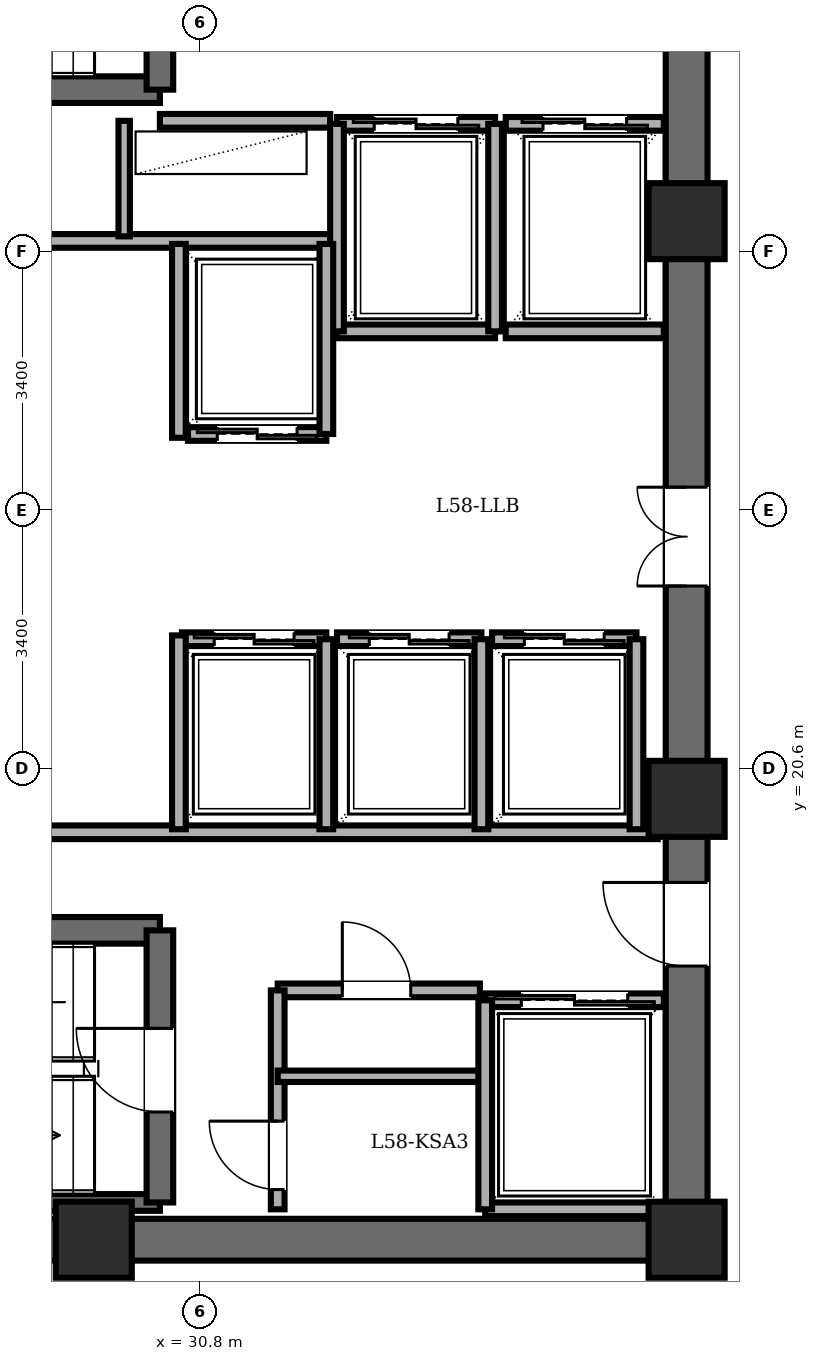
"""IFC4 building model, lengths in metres.
Left out: names, types, materials, properties, quantities, classifications, styles, units other than length and angle.
Written with IfcOpenShell. Run it as: python <this file> out.ifc"""

import sys

from ifc_helpers import new_model, si_unit, direction, frame, frame_2d, origin, origin_2d, place, context, subcontext, project, spatial, rectangle, extrude, element, fill, save


model = new_model("IFC4")
c1 = context("Model", 3, precision=1e-05, world=origin(), true_north=direction((0.0, 1.0)))
c2 = subcontext(c1, "Body", "Model", "MODEL_VIEW")
j1 = project(units=[si_unit("LENGTHUNIT", "METRE"), si_unit("PLANEANGLEUNIT", "RADIAN")], contexts=[c1])
p1 = place(None, origin())
s1 = spatial("IfcSite", under=j1, at=p1, CompositionType="ELEMENT")
p2 = place(p1, origin())
s2 = spatial("IfcBuilding", under=s1, at=p2, CompositionType="ELEMENT")
p3 = place(p2, frame((0.0, 0.0, 222.9)))
s3 = spatial("IfcBuildingStorey", under=s2, at=p3, CompositionType="ELEMENT", Elevation=222.9)
for number, where, z_axis, x_axis in (
    (1, (29.4, 14.4, 0.0), (0.0, 0.0, 1.0), (1.0, 0.0, 0.0)),
    (2, (37.2, 14.4, 0.0), (0.0, 0.0, 1.0), (1.0, 0.0, 0.0)),
    (3, (37.2, 20.2, 0.0), (0.0, 0.0, 1.0), (1.0, 0.0, 0.0)),
    (4, (37.2, 27.8, 0.0), (0.0, 0.0, 1.0), (1.0, 0.0, 0.0)),
):
    element("IfcColumn", number, at=place(p3, frame(where, z_axis=z_axis, x_axis=x_axis)), inside=s3, PredefinedType="COLUMN", context=c2, shape_type="SweptSolid", body=[
        extrude(rectangle(XDim=1.0, YDim=1.0, at=origin_2d()), origin(), (0.0, 0.0, 1.0), 3.6),
    ])
p4 = place(p3, frame((37.2, 14.4, 0.0), z_axis=(0.0, 0.0, 1.0), x_axis=(-1.0, 0.0, 0.0)))
e5 = element("IfcWall", 5, at=p4, inside=s3, PredefinedType="SHEAR", context=c2, shape_type="SweptSolid", body=[
    extrude(rectangle(XDim=15.6, YDim=0.55, at=frame_2d((7.8, 0.0))), origin(), (0.0, 0.0, 1.0), 3.4),
])
p5 = place(p3, frame((37.2, 14.4, 0.0), z_axis=(0.0, 0.0, 1.0), x_axis=(0.0, 1.0, 0.0)))
e6 = element("IfcWall", 6, at=p5, inside=s3, PredefinedType="SHEAR", context=c2, shape_type="SweptSolid", body=[
    extrude(rectangle(XDim=19.2, YDim=0.55, at=frame_2d((9.6, 0.0))), origin(), (0.0, 0.0, 1.0), 3.4),
])
p6 = place(p5, frame((15.8, 0.0, 0.0)))
e7 = element("IfcOpeningElement", 7, at=p6, cuts=e6, PredefinedType="OPENING", context=c2, shape_type="SweptSolid", body=[
    extrude(rectangle(XDim=1.15, YDim=2.15, at=frame_2d((0.575, 1.075))), frame((0.0, 0.285, 0.0), z_axis=(0.0, -1.0, 0.0), x_axis=(1.0, 0.0, 0.0)), (0.0, 0.0, 1.0), 0.57),
])
p7 = place(p5, frame((3.6, 0.0, 0.0)))
e8 = element("IfcOpeningElement", 8, at=p7, cuts=e6, PredefinedType="OPENING", context=c2, shape_type="SweptSolid", body=[
    extrude(rectangle(XDim=1.1, YDim=2.15, at=frame_2d((0.55, 1.075))), frame((0.0, 0.285, 0.0), z_axis=(0.0, -1.0, 0.0), x_axis=(1.0, 0.0, 0.0)), (0.0, 0.0, 1.0), 0.57),
])
p8 = place(p5, frame((8.6, 0.0, 0.0)))
e9 = element("IfcOpeningElement", 9, at=p8, cuts=e6, PredefinedType="OPENING", context=c2, shape_type="SweptSolid", body=[
    extrude(rectangle(XDim=1.3, YDim=2.2, at=frame_2d((0.65, 1.1))), frame((0.0, 0.285, 0.0), z_axis=(0.0, -1.0, 0.0), x_axis=(1.0, 0.0, 0.0)), (0.0, 0.0, 1.0), 0.57),
])
p9 = place(p3, frame((22.48, 29.53, 0.0), z_axis=(0.0, 0.0, 1.0), x_axis=(1.0, 0.0, 0.0)))
e10 = element("IfcWall", 10, at=p9, inside=s3, PredefinedType="SOLIDWALL", context=c2, shape_type="SweptSolid", body=[
    extrude(rectangle(XDim=7.79, YDim=0.35, at=frame_2d((3.895, 0.0))), origin(), (0.0, 0.0, 1.0), 3.4),
])
p10 = place(p3, frame((30.27, 29.53, 0.0), z_axis=(0.0, 0.0, 1.0), x_axis=(0.0, 1.0, 0.0)))
e11 = element("IfcWall", 11, at=p10, inside=s3, PredefinedType="SOLIDWALL", context=c2, shape_type="SweptSolid", body=[
    extrude(rectangle(XDim=3.58, YDim=0.35, at=frame_2d((1.79, 0.0))), origin(), (0.0, 0.0, 1.0), 3.4),
])
p11 = place(p10, frame((1.25, 0.0, 0.0)))
e12 = element("IfcOpeningElement", 12, at=p11, cuts=e11, PredefinedType="OPENING", context=c2, shape_type="SweptSolid", body=[
    extrude(rectangle(XDim=1.1, YDim=2.15, at=frame_2d((0.55, 1.075))), frame((0.0, 0.185, 0.0), z_axis=(0.0, -1.0, 0.0), x_axis=(1.0, 0.0, 0.0)), (0.0, 0.0, 1.0), 0.37),
])
p12 = place(p3, frame((22.48, 18.47, 0.0), z_axis=(0.0, 0.0, 1.0), x_axis=(1.0, 0.0, 0.0)))
e13 = element("IfcWall", 13, at=p12, inside=s3, PredefinedType="SOLIDWALL", context=c2, shape_type="SweptSolid", body=[
    extrude(rectangle(XDim=7.79, YDim=0.35, at=frame_2d((3.895, 0.0))), origin(), (0.0, 0.0, 1.0), 3.4),
])
p13 = place(p3, frame((22.48, 14.89, 0.0), z_axis=(0.0, 0.0, 1.0), x_axis=(1.0, 0.0, 0.0)))
e14 = element("IfcWall", 14, at=p13, inside=s3, PredefinedType="PARTITIONING", context=c2, shape_type="SweptSolid", body=[
    extrude(rectangle(XDim=7.79, YDim=0.22, at=frame_2d((3.895, 0.0))), origin(), (0.0, 0.0, 1.0), 3.4),
])
p14 = place(p3, frame((30.27, 14.89, 0.0), z_axis=(0.0, 0.0, 1.0), x_axis=(0.0, 1.0, 0.0)))
e15 = element("IfcWall", 15, at=p14, inside=s3, PredefinedType="SOLIDWALL", context=c2, shape_type="SweptSolid", body=[
    extrude(rectangle(XDim=3.58, YDim=0.35, at=frame_2d((1.79, 0.0))), origin(), (0.0, 0.0, 1.0), 3.4),
])
p15 = place(p14, frame((1.19, 0.0, 0.0)))
e16 = element("IfcOpeningElement", 16, at=p15, cuts=e15, PredefinedType="OPENING", context=c2, shape_type="SweptSolid", body=[
    extrude(rectangle(XDim=1.1, YDim=2.15, at=frame_2d((0.55, 1.075))), frame((0.0, 0.185, 0.0), z_axis=(0.0, -1.0, 0.0), x_axis=(1.0, 0.0, 0.0)), (0.0, 0.0, 1.0), 0.37),
])
p16 = place(p3, frame((30.27, 29.12, 0.0), z_axis=(0.0, 0.0, 1.0), x_axis=(1.0, 0.0, 0.0)))
e17 = element("IfcWall", 17, at=p16, inside=s3, PredefinedType="PARTITIONING", context=c2, shape_type="SweptSolid", body=[
    extrude(rectangle(XDim=2.24, YDim=0.18, at=frame_2d((1.12, 0.0))), origin(), (0.0, 0.0, 1.0), 3.4),
])
p17 = place(p3, frame((21.95, 27.54, 0.0), z_axis=(0.0, 0.0, 1.0), x_axis=(1.0, 0.0, 0.0)))
e18 = element("IfcWall", 18, at=p17, inside=s3, PredefinedType="PARTITIONING", context=c2, shape_type="SweptSolid", body=[
    extrude(rectangle(XDim=10.56, YDim=0.18, at=frame_2d((5.28, 0.0))), origin(), (0.0, 0.0, 1.0), 3.4),
])
p18 = place(p3, frame((29.8, 27.6, 0.0), z_axis=(0.0, 0.0, 1.0), x_axis=(0.0, 1.0, 0.0)))
e19 = element("IfcWall", 19, at=p18, inside=s3, PredefinedType="PARTITIONING", context=c2, shape_type="SweptSolid", body=[
    extrude(rectangle(XDim=1.52, YDim=0.15, at=frame_2d((0.76, 0.0))), origin(), (0.0, 0.0, 1.0), 3.4),
])
p19 = place(p3, frame((21.95, 19.76, 0.0), z_axis=(0.0, 0.0, 1.0), x_axis=(1.0, 0.0, 0.0)))
e20 = element("IfcWall", 20, at=p19, inside=s3, PredefinedType="PARTITIONING", context=c2, shape_type="SweptSolid", body=[
    extrude(rectangle(XDim=14.87, YDim=0.18, at=frame_2d((7.435, 0.0))), origin(), (0.0, 0.0, 1.0), 3.4),
])
p20 = place(p3, frame((31.82, 17.68, 0.0), z_axis=(0.0, 0.0, 1.0), x_axis=(1.0, 0.0, 0.0)))
e21 = element("IfcWall", 21, at=p20, inside=s3, PredefinedType="PARTITIONING", context=c2, shape_type="SweptSolid", body=[
    extrude(rectangle(XDim=2.66, YDim=0.18, at=frame_2d((1.33, 0.0))), origin(), (0.0, 0.0, 1.0), 3.4),
])
p21 = place(p20, frame((0.85, 0.0, 0.0)))
e22 = element("IfcOpeningElement", 22, at=p21, cuts=e21, PredefinedType="OPENING", context=c2, shape_type="SweptSolid", body=[
    extrude(rectangle(XDim=0.9, YDim=2.05, at=frame_2d((0.45, 1.025))), frame((0.0, 0.1, 0.0), z_axis=(0.0, -1.0, 0.0), x_axis=(1.0, 0.0, 0.0)), (0.0, 0.0, 1.0), 0.2),
])
p22 = place(p3, frame((31.82, 14.8, 0.0), z_axis=(0.0, 0.0, 1.0), x_axis=(0.0, 1.0, 0.0)))
e23 = element("IfcWall", 23, at=p22, inside=s3, PredefinedType="PARTITIONING", context=c2, shape_type="SweptSolid", body=[
    extrude(rectangle(XDim=2.88, YDim=0.18, at=frame_2d((1.44, 0.0))), origin(), (0.0, 0.0, 1.0), 3.4),
])
p23 = place(p22, frame((0.26, 0.0, 0.0)))
e24 = element("IfcOpeningElement", 24, at=p23, cuts=e23, PredefinedType="OPENING", context=c2, shape_type="SweptSolid", body=[
    extrude(rectangle(XDim=0.9, YDim=2.05, at=frame_2d((0.45, 1.025))), frame((0.0, 0.1, 0.0), z_axis=(0.0, -1.0, 0.0), x_axis=(1.0, 0.0, 0.0)), (0.0, 0.0, 1.0), 0.2),
])
p24 = place(p3, frame((31.82, 16.55, 0.0), z_axis=(0.0, 0.0, 1.0), x_axis=(1.0, 0.0, 0.0)))
e25 = element("IfcWall", 25, at=p24, inside=s3, PredefinedType="PARTITIONING", context=c2, shape_type="SweptSolid", body=[
    extrude(rectangle(XDim=2.66, YDim=0.15, at=frame_2d((1.33, 0.0))), origin(), (0.0, 0.0, 1.0), 3.4),
])
p25 = place(p3, frame((32.6, 29.08, 0.0), z_axis=(0.0, 0.0, 1.0), x_axis=(1.0, 0.0, 0.0)))
e26 = element("IfcWall", 26, at=p25, inside=s3, PredefinedType="PARTITIONING", context=c2, shape_type="SweptSolid", body=[
    extrude(rectangle(XDim=2.08, YDim=0.18, at=frame_2d((1.04, 0.0))), origin(), (0.0, 0.0, 1.0), 3.4),
])
p26 = place(p25, frame((0.49, 0.0, 0.0)))
e27 = element("IfcOpeningElement", 27, at=p26, cuts=e26, PredefinedType="OPENING", context=c2, shape_type="SweptSolid", body=[
    extrude(rectangle(XDim=1.1, YDim=2.2, at=frame_2d((0.55, 1.1))), frame((0.0, 0.1, 0.0), z_axis=(0.0, -1.0, 0.0), x_axis=(1.0, 0.0, 0.0)), (0.0, 0.0, 1.0), 0.2),
])
p27 = place(p3, frame((34.68, 26.35, 0.0), z_axis=(0.0, 0.0, 1.0), x_axis=(-1.0, 0.0, 0.0)))
e28 = element("IfcWall", 28, at=p27, inside=s3, PredefinedType="PARTITIONING", context=c2, shape_type="SweptSolid", body=[
    extrude(rectangle(XDim=2.08, YDim=0.18, at=frame_2d((1.04, 0.0))), origin(), (0.0, 0.0, 1.0), 3.4),
])
for number, where, z_axis, x_axis in (
    (29, (34.68, 26.35, 0.0), (0.0, 0.0, 1.0), (0.0, 1.0, 0.0)),
    (30, (32.6, 29.08, 0.0), (0.0, 0.0, 1.0), (0.0, -1.0, 0.0)),
):
    element("IfcWall", number, at=place(p3, frame(where, z_axis=z_axis, x_axis=x_axis)), inside=s3, PredefinedType="PARTITIONING", context=c2, shape_type="SweptSolid", body=[
        extrude(rectangle(XDim=2.73, YDim=0.18, at=frame_2d((1.365, 0.0))), origin(), (0.0, 0.0, 1.0), 3.4),
    ])
p28 = place(p3, frame((34.82, 29.08, 0.0), z_axis=(0.0, 0.0, 1.0), x_axis=(1.0, 0.0, 0.0)))
e31 = element("IfcWall", 31, at=p28, inside=s3, PredefinedType="PARTITIONING", context=c2, shape_type="SweptSolid", body=[
    extrude(rectangle(XDim=2.08, YDim=0.18, at=frame_2d((1.04, 0.0))), origin(), (0.0, 0.0, 1.0), 3.4),
])
p29 = place(p28, frame((0.49, 0.0, 0.0)))
e32 = element("IfcOpeningElement", 32, at=p29, cuts=e31, PredefinedType="OPENING", context=c2, shape_type="SweptSolid", body=[
    extrude(rectangle(XDim=1.1, YDim=2.2, at=frame_2d((0.55, 1.1))), frame((0.0, 0.1, 0.0), z_axis=(0.0, -1.0, 0.0), x_axis=(1.0, 0.0, 0.0)), (0.0, 0.0, 1.0), 0.2),
])
p30 = place(p3, frame((36.9, 26.35, 0.0), z_axis=(0.0, 0.0, 1.0), x_axis=(-1.0, 0.0, 0.0)))
e33 = element("IfcWall", 33, at=p30, inside=s3, PredefinedType="PARTITIONING", context=c2, shape_type="SweptSolid", body=[
    extrude(rectangle(XDim=2.08, YDim=0.18, at=frame_2d((1.04, 0.0))), origin(), (0.0, 0.0, 1.0), 3.4),
])
p31 = place(p3, frame((34.55, 17.55, 0.0), z_axis=(0.0, 0.0, 1.0), x_axis=(1.0, 0.0, 0.0)))
e34 = element("IfcWall", 34, at=p31, inside=s3, PredefinedType="PARTITIONING", context=c2, shape_type="SweptSolid", body=[
    extrude(rectangle(XDim=2.35, YDim=0.18, at=frame_2d((1.175, 0.0))), origin(), (0.0, 0.0, 1.0), 3.4),
])
p32 = place(p31, frame((0.475, 0.0, 0.0)))
e35 = element("IfcOpeningElement", 35, at=p32, cuts=e34, PredefinedType="OPENING", context=c2, shape_type="SweptSolid", body=[
    extrude(rectangle(XDim=1.4, YDim=2.3, at=frame_2d((0.7, 1.15))), frame((0.0, 0.1, 0.0), z_axis=(0.0, -1.0, 0.0), x_axis=(1.0, 0.0, 0.0)), (0.0, 0.0, 1.0), 0.2),
])
p33 = place(p3, frame((36.9, 14.8, 0.0), z_axis=(0.0, 0.0, 1.0), x_axis=(-1.0, 0.0, 0.0)))
e36 = element("IfcWall", 36, at=p33, inside=s3, PredefinedType="PARTITIONING", context=c2, shape_type="SweptSolid", body=[
    extrude(rectangle(XDim=2.35, YDim=0.18, at=frame_2d((1.175, 0.0))), origin(), (0.0, 0.0, 1.0), 3.4),
])
p34 = place(p3, frame((34.55, 17.55, 0.0), z_axis=(0.0, 0.0, 1.0), x_axis=(0.0, -1.0, 0.0)))
e37 = element("IfcWall", 37, at=p34, inside=s3, PredefinedType="PARTITIONING", context=c2, shape_type="SweptSolid", body=[
    extrude(rectangle(XDim=2.75, YDim=0.18, at=frame_2d((1.375, 0.0))), origin(), (0.0, 0.0, 1.0), 3.4),
])
p35 = place(p3, frame((32.46, 25.0, 0.0), z_axis=(0.0, 0.0, 1.0), x_axis=(-1.0, 0.0, 0.0)))
e38 = element("IfcWall", 38, at=p35, inside=s3, PredefinedType="PARTITIONING", context=c2, shape_type="SweptSolid", body=[
    extrude(rectangle(XDim=1.82, YDim=0.18, at=frame_2d((0.91, 0.0))), origin(), (0.0, 0.0, 1.0), 3.4),
])
p36 = place(p35, frame((0.385, 0.0, 0.0)))
e39 = element("IfcOpeningElement", 39, at=p36, cuts=e38, PredefinedType="OPENING", context=c2, shape_type="SweptSolid", body=[
    extrude(rectangle(XDim=1.05, YDim=2.2, at=frame_2d((0.525, 1.1))), frame((0.0, 0.1, 0.0), z_axis=(0.0, -1.0, 0.0), x_axis=(1.0, 0.0, 0.0)), (0.0, 0.0, 1.0), 0.2),
])
p37 = place(p3, frame((32.46, 25.0, 0.0), z_axis=(0.0, 0.0, 1.0), x_axis=(0.0, 1.0, 0.0)))
e40 = element("IfcWall", 40, at=p37, inside=s3, PredefinedType="PARTITIONING", context=c2, shape_type="SweptSolid", body=[
    extrude(rectangle(XDim=2.5, YDim=0.18, at=frame_2d((1.25, 0.0))), origin(), (0.0, 0.0, 1.0), 3.4),
])
p38 = place(p3, frame((30.56, 22.3, 0.0), z_axis=(0.0, 0.0, 1.0), x_axis=(1.0, 0.0, 0.0)))
e41 = element("IfcWall", 41, at=p38, inside=s3, PredefinedType="PARTITIONING", context=c2, shape_type="SweptSolid", body=[
    extrude(rectangle(XDim=1.9, YDim=0.18, at=frame_2d((0.95, 0.0))), origin(), (0.0, 0.0, 1.0), 3.4),
])
p39 = place(p38, frame((0.425, 0.0, 0.0)))
e42 = element("IfcOpeningElement", 42, at=p39, cuts=e41, PredefinedType="OPENING", context=c2, shape_type="SweptSolid", body=[
    extrude(rectangle(XDim=1.05, YDim=2.2, at=frame_2d((0.525, 1.1))), frame((0.0, 0.1, 0.0), z_axis=(0.0, -1.0, 0.0), x_axis=(1.0, 0.0, 0.0)), (0.0, 0.0, 1.0), 0.2),
])
p40 = place(p3, frame((32.46, 19.8, 0.0), z_axis=(0.0, 0.0, 1.0), x_axis=(0.0, 1.0, 0.0)))
e43 = element("IfcWall", 43, at=p40, inside=s3, PredefinedType="PARTITIONING", context=c2, shape_type="SweptSolid", body=[
    extrude(rectangle(XDim=2.5, YDim=0.18, at=frame_2d((1.25, 0.0))), origin(), (0.0, 0.0, 1.0), 3.4),
])
p41 = place(p3, frame((32.6, 22.3, 0.0), z_axis=(0.0, 0.0, 1.0), x_axis=(1.0, 0.0, 0.0)))
e44 = element("IfcWall", 44, at=p41, inside=s3, PredefinedType="PARTITIONING", context=c2, shape_type="SweptSolid", body=[
    extrude(rectangle(XDim=1.9, YDim=0.18, at=frame_2d((0.95, 0.0))), origin(), (0.0, 0.0, 1.0), 3.4),
])
p42 = place(p41, frame((0.425, 0.0, 0.0)))
e45 = element("IfcOpeningElement", 45, at=p42, cuts=e44, PredefinedType="OPENING", context=c2, shape_type="SweptSolid", body=[
    extrude(rectangle(XDim=1.05, YDim=2.2, at=frame_2d((0.525, 1.1))), frame((0.0, 0.1, 0.0), z_axis=(0.0, -1.0, 0.0), x_axis=(1.0, 0.0, 0.0)), (0.0, 0.0, 1.0), 0.2),
])
p43 = place(p3, frame((34.5, 19.8, 0.0), z_axis=(0.0, 0.0, 1.0), x_axis=(0.0, 1.0, 0.0)))
e46 = element("IfcWall", 46, at=p43, inside=s3, PredefinedType="PARTITIONING", context=c2, shape_type="SweptSolid", body=[
    extrude(rectangle(XDim=2.5, YDim=0.18, at=frame_2d((1.25, 0.0))), origin(), (0.0, 0.0, 1.0), 3.4),
])
p44 = place(p3, frame((34.64, 22.3, 0.0), z_axis=(0.0, 0.0, 1.0), x_axis=(1.0, 0.0, 0.0)))
e47 = element("IfcWall", 47, at=p44, inside=s3, PredefinedType="PARTITIONING", context=c2, shape_type="SweptSolid", body=[
    extrude(rectangle(XDim=1.9, YDim=0.18, at=frame_2d((0.95, 0.0))), origin(), (0.0, 0.0, 1.0), 3.4),
])
p45 = place(p44, frame((0.425, 0.0, 0.0)))
e48 = element("IfcOpeningElement", 48, at=p45, cuts=e47, PredefinedType="OPENING", context=c2, shape_type="SweptSolid", body=[
    extrude(rectangle(XDim=1.05, YDim=2.2, at=frame_2d((0.525, 1.1))), frame((0.0, 0.1, 0.0), z_axis=(0.0, -1.0, 0.0), x_axis=(1.0, 0.0, 0.0)), (0.0, 0.0, 1.0), 0.2),
])
p46 = place(p3, frame((36.54, 19.8, 0.0), z_axis=(0.0, 0.0, 1.0), x_axis=(0.0, 1.0, 0.0)))
e49 = element("IfcWall", 49, at=p46, inside=s3, PredefinedType="PARTITIONING", context=c2, shape_type="SweptSolid", body=[
    extrude(rectangle(XDim=2.5, YDim=0.18, at=frame_2d((1.25, 0.0))), origin(), (0.0, 0.0, 1.0), 3.4),
])
for number, where, z_axis, x_axis in (
    (50, (30.52, 24.95, 0.0), (0.0, 0.0, 1.0), (0.0, 1.0, 0.0)),
    (51, (30.52, 19.8, 0.0), (0.0, 0.0, 1.0), (0.0, 1.0, 0.0)),
):
    element("IfcWall", number, at=place(p3, frame(where, z_axis=z_axis, x_axis=x_axis)), inside=s3, PredefinedType="PARTITIONING", context=c2, shape_type="SweptSolid", body=[
        extrude(rectangle(XDim=2.55, YDim=0.18, at=frame_2d((1.275, 0.0))), origin(), (0.0, 0.0, 1.0), 3.4),
    ])
p47 = place(p15, origin())
e52 = element("IfcDoor", 52, at=p47, inside=s3, OperationType="SINGLE_SWING_RIGHT", PredefinedType="DOOR", context=c2, shape_type="SweptSolid", body=[
    extrude(rectangle(XDim=1.1, YDim=2.15, at=frame_2d((0.55, 1.075))), frame((0.0, 0.025, 0.0), z_axis=(0.0, -1.0, 0.0), x_axis=(1.0, 0.0, 0.0)), (0.0, 0.0, 1.0), 0.05),
])
fill(e16, e52)
p48 = place(p7, origin())
e53 = element("IfcDoor", 53, at=p48, inside=s3, OperationType="SINGLE_SWING_RIGHT", PredefinedType="DOOR", context=c2, shape_type="SweptSolid", body=[
    extrude(rectangle(XDim=1.1, YDim=2.15, at=frame_2d((0.55, 1.075))), frame((0.0, 0.025, 0.0), z_axis=(0.0, -1.0, 0.0), x_axis=(1.0, 0.0, 0.0)), (0.0, 0.0, 1.0), 0.05),
])
fill(e8, e53)
p49 = place(p21, origin())
e54 = element("IfcDoor", 54, at=p49, inside=s3, OperationType="SINGLE_SWING_LEFT", PredefinedType="DOOR", context=c2, shape_type="SweptSolid", body=[
    extrude(rectangle(XDim=0.9, YDim=2.05, at=frame_2d((0.45, 1.025))), frame((0.0, 0.025, 0.0), z_axis=(0.0, -1.0, 0.0), x_axis=(1.0, 0.0, 0.0)), (0.0, 0.0, 1.0), 0.05),
])
fill(e22, e54)
p50 = place(p23, origin())
e55 = element("IfcDoor", 55, at=p50, inside=s3, OperationType="SINGLE_SWING_RIGHT", PredefinedType="DOOR", context=c2, shape_type="SweptSolid", body=[
    extrude(rectangle(XDim=0.9, YDim=2.05, at=frame_2d((0.45, 1.025))), frame((0.0, 0.025, 0.0), z_axis=(0.0, -1.0, 0.0), x_axis=(1.0, 0.0, 0.0)), (0.0, 0.0, 1.0), 0.05),
])
fill(e24, e55)
p51 = place(p26, origin())
e56 = element("IfcDoor", 56, at=p51, inside=s3, OperationType="DOUBLE_DOOR_SLIDING", PredefinedType="DOOR", context=c2, shape_type="SweptSolid", body=[
    extrude(rectangle(XDim=1.1, YDim=2.2, at=frame_2d((0.55, 1.1))), frame((0.0, 0.025, 0.0), z_axis=(0.0, -1.0, 0.0), x_axis=(1.0, 0.0, 0.0)), (0.0, 0.0, 1.0), 0.05),
])
fill(e27, e56)
p52 = place(p29, origin())
e57 = element("IfcDoor", 57, at=p52, inside=s3, OperationType="DOUBLE_DOOR_SLIDING", PredefinedType="DOOR", context=c2, shape_type="SweptSolid", body=[
    extrude(rectangle(XDim=1.1, YDim=2.2, at=frame_2d((0.55, 1.1))), frame((0.0, 0.025, 0.0), z_axis=(0.0, -1.0, 0.0), x_axis=(1.0, 0.0, 0.0)), (0.0, 0.0, 1.0), 0.05),
])
fill(e32, e57)
p53 = place(p32, origin())
e58 = element("IfcDoor", 58, at=p53, inside=s3, OperationType="DOUBLE_DOOR_SLIDING", PredefinedType="DOOR", context=c2, shape_type="SweptSolid", body=[
    extrude(rectangle(XDim=1.4, YDim=2.3, at=frame_2d((0.7, 1.15))), frame((0.0, 0.025, 0.0), z_axis=(0.0, -1.0, 0.0), x_axis=(1.0, 0.0, 0.0)), (0.0, 0.0, 1.0), 0.05),
])
fill(e35, e58)
p54 = place(p36, origin())
e59 = element("IfcDoor", 59, at=p54, inside=s3, OperationType="DOUBLE_DOOR_SLIDING", PredefinedType="DOOR", context=c2, shape_type="SweptSolid", body=[
    extrude(rectangle(XDim=1.05, YDim=2.2, at=frame_2d((0.525, 1.1))), frame((0.0, 0.025, 0.0), z_axis=(0.0, -1.0, 0.0), x_axis=(1.0, 0.0, 0.0)), (0.0, 0.0, 1.0), 0.05),
])
fill(e39, e59)
p55 = place(p39, origin())
e60 = element("IfcDoor", 60, at=p55, inside=s3, OperationType="DOUBLE_DOOR_SLIDING", PredefinedType="DOOR", context=c2, shape_type="SweptSolid", body=[
    extrude(rectangle(XDim=1.05, YDim=2.2, at=frame_2d((0.525, 1.1))), frame((0.0, 0.025, 0.0), z_axis=(0.0, -1.0, 0.0), x_axis=(1.0, 0.0, 0.0)), (0.0, 0.0, 1.0), 0.05),
])
fill(e42, e60)
p56 = place(p42, origin())
e61 = element("IfcDoor", 61, at=p56, inside=s3, OperationType="DOUBLE_DOOR_SLIDING", PredefinedType="DOOR", context=c2, shape_type="SweptSolid", body=[
    extrude(rectangle(XDim=1.05, YDim=2.2, at=frame_2d((0.525, 1.1))), frame((0.0, 0.025, 0.0), z_axis=(0.0, -1.0, 0.0), x_axis=(1.0, 0.0, 0.0)), (0.0, 0.0, 1.0), 0.05),
])
fill(e45, e61)
p57 = place(p45, origin())
e62 = element("IfcDoor", 62, at=p57, inside=s3, OperationType="DOUBLE_DOOR_SLIDING", PredefinedType="DOOR", context=c2, shape_type="SweptSolid", body=[
    extrude(rectangle(XDim=1.05, YDim=2.2, at=frame_2d((0.525, 1.1))), frame((0.0, 0.025, 0.0), z_axis=(0.0, -1.0, 0.0), x_axis=(1.0, 0.0, 0.0)), (0.0, 0.0, 1.0), 0.05),
])
fill(e48, e62)
p58 = place(p8, origin())
e63 = element("IfcDoor", 63, at=p58, inside=s3, OperationType="DOUBLE_DOOR_SINGLE_SWING", PredefinedType="DOOR", context=c2, shape_type="SweptSolid", body=[
    extrude(rectangle(XDim=1.3, YDim=2.2, at=frame_2d((0.65, 1.1))), frame((0.0, 0.025, 0.0), z_axis=(0.0, -1.0, 0.0), x_axis=(1.0, 0.0, 0.0)), (0.0, 0.0, 1.0), 0.05),
])
fill(e9, e63)
save(model, sys.argv[1])
